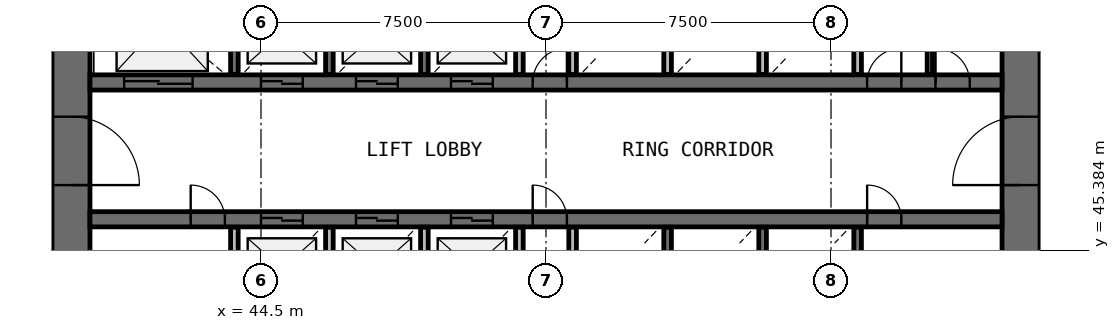
"""IFC4 building model, lengths in metres.
Left out: names, types, materials, properties, quantities, classifications, styles, units other than length and angle.
Written with IfcOpenShell. Run it as: python <this file> out.ifc"""

import sys

from ifc_helpers import new_model, si_unit, direction, frame, frame_2d, origin, place, context, subcontext, project, spatial, rectangle, extrude, source, transform, mapped, element, fill, save


model = new_model("IFC4")
c1 = context("Model", 3, precision=1e-05, world=origin(), true_north=direction((0.0, 1.0)))
c2 = subcontext(c1, "Body", "Model", "MODEL_VIEW")
j1 = project(units=[si_unit("LENGTHUNIT", "METRE"), si_unit("PLANEANGLEUNIT", "RADIAN")], contexts=[c1])
p1 = place(None, origin())
s1 = spatial("IfcSite", under=j1, at=p1, CompositionType="ELEMENT")
p2 = place(p1, origin())
s2 = spatial("IfcBuilding", under=s1, at=p2, CompositionType="ELEMENT")
p3 = place(p2, frame((0.0, 0.0, 35.8)))
s3 = spatial("IfcBuildingStorey", under=s2, at=p3, CompositionType="ELEMENT", Elevation=35.8)
p4 = place(p3, frame((64.5, 38.0, 0.0), z_axis=(0.0, 0.0, 1.0), x_axis=(0.0, 1.0, 0.0)))
e1 = element("IfcWall", 1, at=p4, inside=s3, PredefinedType="SHEAR", context=c2, shape_type="SweptSolid", body=[
    extrude(rectangle(XDim=20.0, YDim=1.0, at=frame_2d((10.0, 0.0))), origin(), (0.0, 0.0, 1.0), 4.4),
])
p5 = place(p4, frame((9.1, 0.0, 0.0)))
e2 = element("IfcOpeningElement", 2, at=p5, cuts=e1, PredefinedType="OPENING", context=c2, shape_type="SweptSolid", body=[
    extrude(rectangle(XDim=1.8, YDim=2.1, at=frame_2d((0.9, 1.05))), frame((0.0, 0.51, 0.0), z_axis=(0.0, -1.0, 0.0), x_axis=(1.0, 0.0, 0.0)), (0.0, 0.0, 1.0), 1.02),
])
p6 = place(p3, frame((39.5, 58.0, 0.0), z_axis=(0.0, 0.0, 1.0), x_axis=(0.0, -1.0, 0.0)))
e3 = element("IfcWall", 3, at=p6, inside=s3, PredefinedType="SHEAR", context=c2, shape_type="SweptSolid", body=[
    extrude(rectangle(XDim=20.0, YDim=1.0, at=frame_2d((10.0, 0.0))), origin(), (0.0, 0.0, 1.0), 4.4),
])
p7 = place(p6, frame((9.1, 0.0, 0.0)))
e4 = element("IfcOpeningElement", 4, at=p7, cuts=e3, PredefinedType="OPENING", context=c2, shape_type="SweptSolid", body=[
    extrude(rectangle(XDim=1.8, YDim=2.1, at=frame_2d((0.9, 1.05))), frame((0.0, 0.51, 0.0), z_axis=(0.0, -1.0, 0.0), x_axis=(1.0, 0.0, 0.0)), (0.0, 0.0, 1.0), 1.02),
])
p8 = place(p3, frame((40.0, 49.8, 0.0), z_axis=(0.0, 0.0, 1.0), x_axis=(1.0, 0.0, 0.0)))
e5 = element("IfcWall", 5, at=p8, inside=s3, PredefinedType="SHEAR", context=c2, shape_type="SweptSolid", body=[
    extrude(rectangle(XDim=24.0, YDim=0.4, at=frame_2d((12.0, 0.0))), origin(), (0.0, 0.0, 1.0), 4.4),
])
p9 = place(p8, frame((4.5, 0.0, 0.0)))
e6 = element("IfcOpeningElement", 6, at=p9, cuts=e5, PredefinedType="OPENING", context=c2, shape_type="SweptSolid", body=[
    extrude(rectangle(XDim=1.1, YDim=2.1, at=frame_2d((0.55, 1.05))), frame((0.0, 0.21, 0.0), z_axis=(0.0, -1.0, 0.0), x_axis=(1.0, 0.0, 0.0)), (0.0, 0.0, 1.0), 0.42),
])
p10 = place(p8, frame((7.0, 0.0, 0.0)))
e7 = element("IfcOpeningElement", 7, at=p10, cuts=e5, PredefinedType="OPENING", context=c2, shape_type="SweptSolid", body=[
    extrude(rectangle(XDim=1.1, YDim=2.1, at=frame_2d((0.55, 1.05))), frame((0.0, 0.21, 0.0), z_axis=(0.0, -1.0, 0.0), x_axis=(1.0, 0.0, 0.0)), (0.0, 0.0, 1.0), 0.42),
])
p11 = place(p8, frame((9.5, 0.0, 0.0)))
e8 = element("IfcOpeningElement", 8, at=p11, cuts=e5, PredefinedType="OPENING", context=c2, shape_type="SweptSolid", body=[
    extrude(rectangle(XDim=1.1, YDim=2.1, at=frame_2d((0.55, 1.05))), frame((0.0, 0.21, 0.0), z_axis=(0.0, -1.0, 0.0), x_axis=(1.0, 0.0, 0.0)), (0.0, 0.0, 1.0), 0.42),
])
p12 = place(p8, frame((0.9, 0.0, 0.0)))
e9 = element("IfcOpeningElement", 9, at=p12, cuts=e5, PredefinedType="OPENING", context=c2, shape_type="SweptSolid", body=[
    extrude(rectangle(XDim=1.8, YDim=2.4, at=frame_2d((0.9, 1.2))), frame((0.0, 0.21, 0.0), z_axis=(0.0, -1.0, 0.0), x_axis=(1.0, 0.0, 0.0)), (0.0, 0.0, 1.0), 0.42),
])
p13 = place(p8, frame((20.45, 0.0, 0.0)))
e10 = element("IfcOpeningElement", 10, at=p13, cuts=e5, PredefinedType="OPENING", context=c2, shape_type="SweptSolid", body=[
    extrude(rectangle(XDim=0.9, YDim=2.1, at=frame_2d((0.45, 1.05))), frame((0.0, 0.21, 0.0), z_axis=(0.0, -1.0, 0.0), x_axis=(1.0, 0.0, 0.0)), (0.0, 0.0, 1.0), 0.42),
])
p14 = place(p8, frame((22.25, 0.0, 0.0)))
e11 = element("IfcOpeningElement", 11, at=p14, cuts=e5, PredefinedType="OPENING", context=c2, shape_type="SweptSolid", body=[
    extrude(rectangle(XDim=0.9, YDim=2.1, at=frame_2d((0.45, 1.05))), frame((0.0, 0.21, 0.0), z_axis=(0.0, -1.0, 0.0), x_axis=(1.0, 0.0, 0.0)), (0.0, 0.0, 1.0), 0.42),
])
p15 = place(p8, frame((11.65, 0.0, 0.0)))
e12 = element("IfcOpeningElement", 12, at=p15, cuts=e5, PredefinedType="OPENING", context=c2, shape_type="SweptSolid", body=[
    extrude(rectangle(XDim=0.9, YDim=2.1, at=frame_2d((0.45, 1.05))), frame((0.0, 0.21, 0.0), z_axis=(0.0, -1.0, 0.0), x_axis=(1.0, 0.0, 0.0)), (0.0, 0.0, 1.0), 0.42),
])
p16 = place(p3, frame((40.0, 46.2, 0.0), z_axis=(0.0, 0.0, 1.0), x_axis=(1.0, 0.0, 0.0)))
e13 = element("IfcWall", 13, at=p16, inside=s3, PredefinedType="SHEAR", context=c2, shape_type="SweptSolid", body=[
    extrude(rectangle(XDim=24.0, YDim=0.4, at=frame_2d((12.0, 0.0))), origin(), (0.0, 0.0, 1.0), 4.4),
])
p17 = place(p16, frame((4.5, 0.0, 0.0)))
e14 = element("IfcOpeningElement", 14, at=p17, cuts=e13, PredefinedType="OPENING", context=c2, shape_type="SweptSolid", body=[
    extrude(rectangle(XDim=1.1, YDim=2.1, at=frame_2d((0.55, 1.05))), frame((0.0, 0.21, 0.0), z_axis=(0.0, -1.0, 0.0), x_axis=(1.0, 0.0, 0.0)), (0.0, 0.0, 1.0), 0.42),
])
p18 = place(p16, frame((7.0, 0.0, 0.0)))
e15 = element("IfcOpeningElement", 15, at=p18, cuts=e13, PredefinedType="OPENING", context=c2, shape_type="SweptSolid", body=[
    extrude(rectangle(XDim=1.1, YDim=2.1, at=frame_2d((0.55, 1.05))), frame((0.0, 0.21, 0.0), z_axis=(0.0, -1.0, 0.0), x_axis=(1.0, 0.0, 0.0)), (0.0, 0.0, 1.0), 0.42),
])
p19 = place(p16, frame((9.5, 0.0, 0.0)))
e16 = element("IfcOpeningElement", 16, at=p19, cuts=e13, PredefinedType="OPENING", context=c2, shape_type="SweptSolid", body=[
    extrude(rectangle(XDim=1.1, YDim=2.1, at=frame_2d((0.55, 1.05))), frame((0.0, 0.21, 0.0), z_axis=(0.0, -1.0, 0.0), x_axis=(1.0, 0.0, 0.0)), (0.0, 0.0, 1.0), 0.42),
])
p20 = place(p16, frame((20.45, 0.0, 0.0)))
e17 = element("IfcOpeningElement", 17, at=p20, cuts=e13, PredefinedType="OPENING", context=c2, shape_type="SweptSolid", body=[
    extrude(rectangle(XDim=0.9, YDim=2.1, at=frame_2d((0.45, 1.05))), frame((0.0, 0.21, 0.0), z_axis=(0.0, -1.0, 0.0), x_axis=(1.0, 0.0, 0.0)), (0.0, 0.0, 1.0), 0.42),
])
p21 = place(p16, frame((2.65, 0.0, 0.0)))
e18 = element("IfcOpeningElement", 18, at=p21, cuts=e13, PredefinedType="OPENING", context=c2, shape_type="SweptSolid", body=[
    extrude(rectangle(XDim=0.9, YDim=2.1, at=frame_2d((0.45, 1.05))), frame((0.0, 0.21, 0.0), z_axis=(0.0, -1.0, 0.0), x_axis=(1.0, 0.0, 0.0)), (0.0, 0.0, 1.0), 0.42),
])
p22 = place(p16, frame((11.65, 0.0, 0.0)))
e19 = element("IfcOpeningElement", 19, at=p22, cuts=e13, PredefinedType="OPENING", context=c2, shape_type="SweptSolid", body=[
    extrude(rectangle(XDim=0.9, YDim=2.1, at=frame_2d((0.45, 1.05))), frame((0.0, 0.21, 0.0), z_axis=(0.0, -1.0, 0.0), x_axis=(1.0, 0.0, 0.0)), (0.0, 0.0, 1.0), 0.42),
])
for number, where, z_axis, x_axis in (
    (20, (43.8, 45.99, 0.0), (0.0, 0.0, 1.0), (0.0, -1.0, 0.0)),
    (21, (43.8, 52.37, 0.0), (0.0, 0.0, 1.0), (0.0, -1.0, 0.0)),
):
    element("IfcWall", number, at=place(p3, frame(where, z_axis=z_axis, x_axis=x_axis)), inside=s3, PredefinedType="SOLIDWALL", context=c2, shape_type="SweptSolid", body=[
        extrude(rectangle(XDim=2.36, YDim=0.2, at=frame_2d((1.18, 0.0))), origin(), (0.0, 0.0, 1.0), 3.95),
    ])
p23 = place(p3, frame((46.3, 43.6, 0.0), z_axis=(0.0, 0.0, 1.0), x_axis=(0.0, 1.0, 0.0)))
e22 = element("IfcWall", 22, at=p23, inside=s3, PredefinedType="SOLIDWALL", context=c2, shape_type="SweptSolid", body=[
    extrude(rectangle(XDim=2.39, YDim=0.2, at=frame_2d((1.195, 0.0))), origin(), (0.0, 0.0, 1.0), 3.95),
])
for number, where, z_axis, x_axis in (
    (23, (46.3, 50.01, 0.0), (0.0, 0.0, 1.0), (0.0, 1.0, 0.0)),
    (24, (48.8, 43.63, 0.0), (0.0, 0.0, 1.0), (0.0, 1.0, 0.0)),
    (25, (48.8, 50.01, 0.0), (0.0, 0.0, 1.0), (0.0, 1.0, 0.0)),
    (26, (51.3, 43.63, 0.0), (0.0, 0.0, 1.0), (0.0, 1.0, 0.0)),
):
    element("IfcWall", number, at=place(p3, frame(where, z_axis=z_axis, x_axis=x_axis)), inside=s3, PredefinedType="SOLIDWALL", context=c2, shape_type="SweptSolid", body=[
        extrude(rectangle(XDim=2.36, YDim=0.2, at=frame_2d((1.18, 0.0))), origin(), (0.0, 0.0, 1.0), 3.95),
    ])
for number, where, z_axis, x_axis in (
    (27, (51.3, 50.01, 0.0), (0.0, 0.0, 1.0), (0.0, 1.0, 0.0)),
    (28, (52.7, 45.99, 0.0), (0.0, 0.0, 1.0), (0.0, -1.0, 0.0)),
):
    element("IfcWall", number, at=place(p3, frame(where, z_axis=z_axis, x_axis=x_axis)), inside=s3, PredefinedType="SOLIDWALL", context=c2, shape_type="SweptSolid", body=[
        extrude(rectangle(XDim=2.39, YDim=0.2, at=frame_2d((1.195, 0.0))), origin(), (0.0, 0.0, 1.0), 3.95),
    ])
for number, where, z_axis, x_axis in (
    (29, (52.7, 52.37, 0.0), (0.0, 0.0, 1.0), (0.0, -1.0, 0.0)),
    (30, (55.2, 43.63, 0.0), (0.0, 0.0, 1.0), (0.0, 1.0, 0.0)),
    (31, (55.2, 50.01, 0.0), (0.0, 0.0, 1.0), (0.0, 1.0, 0.0)),
    (32, (57.7, 43.63, 0.0), (0.0, 0.0, 1.0), (0.0, 1.0, 0.0)),
):
    element("IfcWall", number, at=place(p3, frame(where, z_axis=z_axis, x_axis=x_axis)), inside=s3, PredefinedType="SOLIDWALL", context=c2, shape_type="SweptSolid", body=[
        extrude(rectangle(XDim=2.36, YDim=0.2, at=frame_2d((1.18, 0.0))), origin(), (0.0, 0.0, 1.0), 3.95),
    ])
p24 = place(p3, frame((57.7, 50.01, 0.0), z_axis=(0.0, 0.0, 1.0), x_axis=(0.0, 1.0, 0.0)))
e33 = element("IfcWall", 33, at=p24, inside=s3, PredefinedType="SOLIDWALL", context=c2, shape_type="SweptSolid", body=[
    extrude(rectangle(XDim=2.39, YDim=0.2, at=frame_2d((1.195, 0.0))), origin(), (0.0, 0.0, 1.0), 3.95),
])
for number, where, z_axis, x_axis in (
    (34, (60.2, 43.63, 0.0), (0.0, 0.0, 1.0), (0.0, 1.0, 0.0)),
    (35, (60.2, 50.01, 0.0), (0.0, 0.0, 1.0), (0.0, 1.0, 0.0)),
):
    element("IfcWall", number, at=place(p3, frame(where, z_axis=z_axis, x_axis=x_axis)), inside=s3, PredefinedType="SOLIDWALL", context=c2, shape_type="SweptSolid", body=[
        extrude(rectangle(XDim=2.36, YDim=0.2, at=frame_2d((1.18, 0.0))), origin(), (0.0, 0.0, 1.0), 3.95),
    ])
p25 = place(p3, frame((62.1, 50.01, 0.0), z_axis=(0.0, 0.0, 1.0), x_axis=(0.0, 1.0, 0.0)))
e36 = element("IfcWall", 36, at=p25, inside=s3, PredefinedType="PARTITIONING", context=c2, shape_type="SweptSolid", body=[
    extrude(rectangle(XDim=2.39, YDim=0.14, at=frame_2d((1.195, 0.0))), origin(), (0.0, 0.0, 1.0), 3.05),
])
m1 = source(origin(), c2, "Body", "SweptSolid", [
    extrude(rectangle(XDim=1.8, YDim=2.1, at=frame_2d((0.9, 1.05))), frame((0.0, 0.025, 0.0), z_axis=(0.0, -1.0, 0.0), x_axis=(1.0, 0.0, 0.0)), (0.0, 0.0, 1.0), 0.05),
])
p26 = place(p7, origin())
e37 = element("IfcDoor", 37, at=p26, inside=s3, OperationType="SINGLE_SWING_RIGHT", PredefinedType="DOOR", context=c2, shape_type="MappedRepresentation", body=[
    mapped(m1, transform((0.0, 0.0, 0.0), scale=1.0)),
])
fill(e4, e37)
p27 = place(p5, origin())
e38 = element("IfcDoor", 38, at=p27, inside=s3, OperationType="SINGLE_SWING_LEFT", PredefinedType="DOOR", context=c2, shape_type="MappedRepresentation", body=[
    mapped(m1, transform((0.0, 0.0, 0.0), scale=1.0)),
])
fill(e2, e38)
m2 = source(origin(), c2, "Body", "SweptSolid", [
    extrude(rectangle(XDim=1.1, YDim=2.1, at=frame_2d((0.55, 1.05))), frame((0.0, 0.025, 0.0), z_axis=(0.0, -1.0, 0.0), x_axis=(1.0, 0.0, 0.0)), (0.0, 0.0, 1.0), 0.05),
])
p28 = place(p9, origin())
e39 = element("IfcDoor", 39, at=p28, inside=s3, OperationType="DOUBLE_DOOR_SLIDING", PredefinedType="USERDEFINED", context=c2, shape_type="MappedRepresentation", body=[
    mapped(m2, transform((0.0, 0.0, 0.0), scale=1.0)),
])
fill(e6, e39)
p29 = place(p10, origin())
e40 = element("IfcDoor", 40, at=p29, inside=s3, OperationType="DOUBLE_DOOR_SLIDING", PredefinedType="USERDEFINED", context=c2, shape_type="MappedRepresentation", body=[
    mapped(m2, transform((0.0, 0.0, 0.0), scale=1.0)),
])
fill(e7, e40)
p30 = place(p11, origin())
e41 = element("IfcDoor", 41, at=p30, inside=s3, OperationType="DOUBLE_DOOR_SLIDING", PredefinedType="USERDEFINED", context=c2, shape_type="MappedRepresentation", body=[
    mapped(m2, transform((0.0, 0.0, 0.0), scale=1.0)),
])
fill(e8, e41)
p31 = place(p17, origin())
e42 = element("IfcDoor", 42, at=p31, inside=s3, OperationType="DOUBLE_DOOR_SLIDING", PredefinedType="USERDEFINED", context=c2, shape_type="MappedRepresentation", body=[
    mapped(m2, transform((0.0, 0.0, 0.0), scale=1.0)),
])
fill(e14, e42)
p32 = place(p18, origin())
e43 = element("IfcDoor", 43, at=p32, inside=s3, OperationType="DOUBLE_DOOR_SLIDING", PredefinedType="USERDEFINED", context=c2, shape_type="MappedRepresentation", body=[
    mapped(m2, transform((0.0, 0.0, 0.0), scale=1.0)),
])
fill(e15, e43)
p33 = place(p19, origin())
e44 = element("IfcDoor", 44, at=p33, inside=s3, OperationType="DOUBLE_DOOR_SLIDING", PredefinedType="USERDEFINED", context=c2, shape_type="MappedRepresentation", body=[
    mapped(m2, transform((0.0, 0.0, 0.0), scale=1.0)),
])
fill(e16, e44)
m3 = source(origin(), c2, "Body", "SweptSolid", [
    extrude(rectangle(XDim=1.8, YDim=2.4, at=frame_2d((0.9, 1.2))), frame((0.0, 0.025, 0.0), z_axis=(0.0, -1.0, 0.0), x_axis=(1.0, 0.0, 0.0)), (0.0, 0.0, 1.0), 0.05),
])
p34 = place(p12, origin())
e45 = element("IfcDoor", 45, at=p34, inside=s3, OperationType="DOUBLE_DOOR_SLIDING", PredefinedType="USERDEFINED", context=c2, shape_type="MappedRepresentation", body=[
    mapped(m3, transform((0.0, 0.0, 0.0), scale=1.0)),
])
fill(e9, e45)
m4 = source(origin(), c2, "Body", "SweptSolid", [
    extrude(rectangle(XDim=0.9, YDim=2.1, at=frame_2d((0.45, 1.05))), frame((0.0, 0.025, 0.0), z_axis=(0.0, -1.0, 0.0), x_axis=(1.0, 0.0, 0.0)), (0.0, 0.0, 1.0), 0.05),
])
p35 = place(p20, origin())
e46 = element("IfcDoor", 46, at=p35, inside=s3, OperationType="SINGLE_SWING_LEFT", PredefinedType="DOOR", context=c2, shape_type="MappedRepresentation", body=[
    mapped(m4, transform((0.0, 0.0, 0.0), scale=1.0)),
])
fill(e17, e46)
p36 = place(p13, origin())
e47 = element("IfcDoor", 47, at=p36, inside=s3, OperationType="SINGLE_SWING_RIGHT", PredefinedType="DOOR", context=c2, shape_type="MappedRepresentation", body=[
    mapped(m4, transform((0.0, 0.0, 0.0), scale=1.0)),
])
fill(e10, e47)
p37 = place(p14, origin())
e48 = element("IfcDoor", 48, at=p37, inside=s3, OperationType="SINGLE_SWING_LEFT", PredefinedType="DOOR", context=c2, shape_type="MappedRepresentation", body=[
    mapped(m4, transform((0.0, 0.0, 0.0), scale=1.0)),
])
fill(e11, e48)
p38 = place(p21, origin())
e49 = element("IfcDoor", 49, at=p38, inside=s3, OperationType="SINGLE_SWING_LEFT", PredefinedType="DOOR", context=c2, shape_type="MappedRepresentation", body=[
    mapped(m4, transform((0.0, 0.0, 0.0), scale=1.0)),
])
fill(e18, e49)
p39 = place(p15, origin())
e50 = element("IfcDoor", 50, at=p39, inside=s3, OperationType="SINGLE_SWING_RIGHT", PredefinedType="DOOR", context=c2, shape_type="MappedRepresentation", body=[
    mapped(m4, transform((0.0, 0.0, 0.0), scale=1.0)),
])
fill(e12, e50)
p40 = place(p22, origin())
e51 = element("IfcDoor", 51, at=p40, inside=s3, OperationType="SINGLE_SWING_LEFT", PredefinedType="DOOR", context=c2, shape_type="MappedRepresentation", body=[
    mapped(m4, transform((0.0, 0.0, 0.0), scale=1.0)),
])
fill(e19, e51)
save(model, sys.argv[1])
